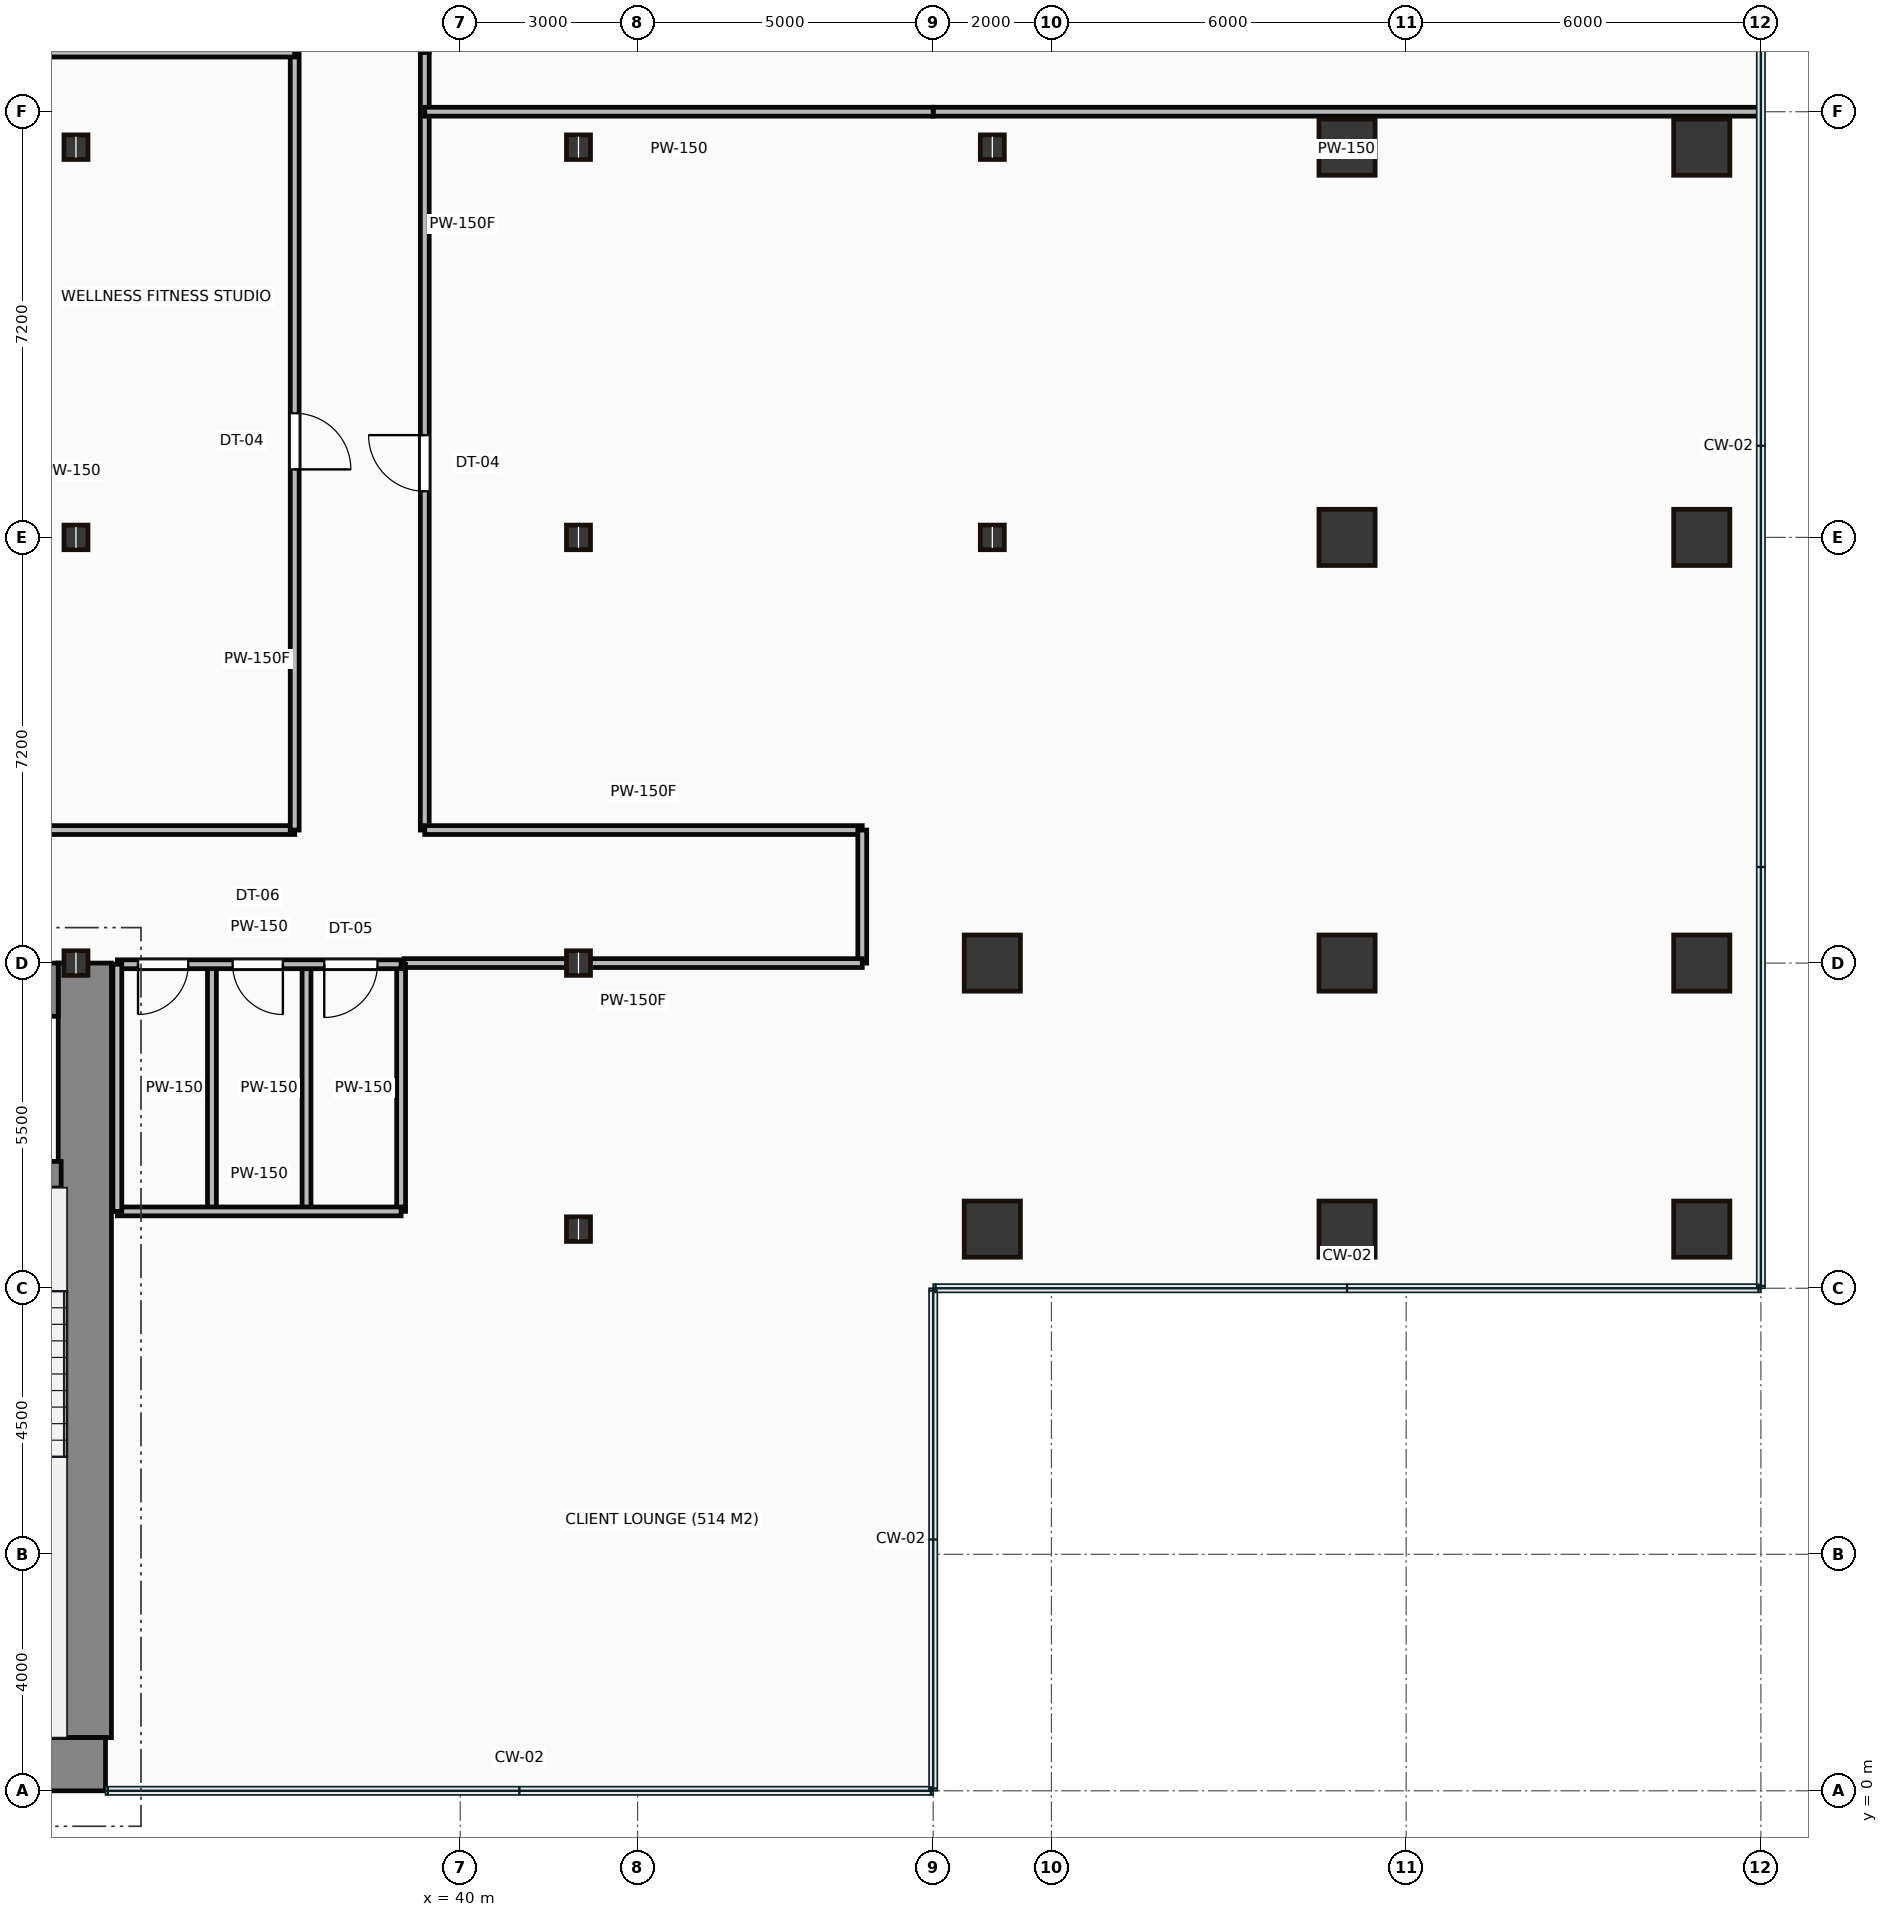
"""IFC4 building model, lengths in metres.
Left out: names, types, materials, properties, quantities, classifications, styles, units other than length and angle.
Written with IfcOpenShell. Run it as: python <this file> out.ifc"""

import sys

from ifc_helpers import new_model, si_unit, direction, frame, frame_2d, origin, origin_2d, place, context, subcontext, project, spatial, rectangle, hollow_rectangle, i_section, extrude, source, transform, mapped, element, fill, save


model = new_model("IFC4")
c1 = context("Model", 3, precision=1e-05, world=origin(), true_north=direction((0.0, 1.0)))
c2 = subcontext(c1, "Body", "Model", "MODEL_VIEW")
j1 = project(units=[si_unit("LENGTHUNIT", "METRE"), si_unit("PLANEANGLEUNIT", "RADIAN")], contexts=[c1])
p1 = place(None, origin())
s1 = spatial("IfcSite", under=j1, at=p1, CompositionType="ELEMENT")
p2 = place(p1, origin())
s2 = spatial("IfcBuilding", under=s1, at=p2, CompositionType="ELEMENT")
p3 = place(p2, frame((0.0, 0.0, 36.15)))
s3 = spatial("IfcBuildingStorey", under=s2, at=p3, CompositionType="ELEMENT", Elevation=36.15)
m1 = source(origin(), c2, "Body", "SweptSolid", [
    extrude(rectangle(XDim=29.5, YDim=0.9, at=frame_2d((14.75, 0.0))), origin(), (0.0, 0.0, 1.0), 3.65),
])
p4 = place(p3, frame((4.5, 0.45, 0.0), z_axis=(0.0, 0.0, 1.0), x_axis=(1.0, 0.0, 0.0)))
e1 = element("IfcWall", 1, at=p4, inside=s3, PredefinedType="SHEAR", context=c2, shape_type="MappedRepresentation", body=[
    mapped(m1, transform((0.0, 0.0, 0.0))),
])
m2 = source(origin(), c2, "Body", "SweptSolid", [
    extrude(rectangle(XDim=13.1, YDim=0.9, at=frame_2d((6.55, 0.0))), origin(), (0.0, 0.0, 1.0), 3.65),
])
p5 = place(p3, frame((33.65, 0.9, 0.0), z_axis=(0.0, 0.0, 1.0), x_axis=(0.0, 1.0, 0.0)))
e2 = element("IfcWall", 2, at=p5, inside=s3, PredefinedType="SHEAR", context=c2, shape_type="MappedRepresentation", body=[
    mapped(m2, transform((0.0, 0.0, 0.0))),
])
m3 = source(origin(), c2, "Body", "SweptSolid", [
    extrude(rectangle(XDim=12.6, YDim=0.9, at=frame_2d((6.3, 0.0))), origin(), (0.0, 0.0, 1.0), 3.65),
])
p6 = place(p3, frame((20.6, 13.55, 0.0), z_axis=(0.0, 0.0, 1.0), x_axis=(1.0, 0.0, 0.0)))
e3 = element("IfcWall", 3, at=p6, inside=s3, PredefinedType="SHEAR", context=c2, shape_type="MappedRepresentation", body=[
    mapped(m3, transform((0.0, 0.0, 0.0))),
])
p7 = place(p6, frame((9.25, 0.0, 0.0)))
e4 = element("IfcOpeningElement", 4, at=p7, cuts=e3, PredefinedType="OPENING", context=c2, shape_type="SweptSolid", body=[
    extrude(rectangle(XDim=1.1, YDim=2.15, at=frame_2d((0.55, 1.075))), frame((0.0, 0.46, 0.0), z_axis=(0.0, -1.0, 0.0), x_axis=(1.0, 0.0, 0.0)), (0.0, 0.0, 1.0), 0.92),
])
m4 = source(origin(), c2, "Body", "SweptSolid", [
    extrude(rectangle(XDim=3.39, YDim=0.45, at=frame_2d((1.695, 0.0))), origin(), (0.0, 0.0, 1.0), 3.65),
])
p8 = place(p3, frame((29.86, 10.42, 0.0), z_axis=(0.0, 0.0, 1.0), x_axis=(1.0, 0.0, 0.0)))
e5 = element("IfcWall", 5, at=p8, inside=s3, PredefinedType="SHEAR", context=c2, shape_type="MappedRepresentation", body=[
    mapped(m4, transform((0.0, 0.0, 0.0))),
])
p9 = place(p8, frame((1.1, 0.0, 0.0)))
e6 = element("IfcOpeningElement", 6, at=p9, cuts=e5, PredefinedType="OPENING", context=c2, shape_type="SweptSolid", body=[
    extrude(rectangle(XDim=1.1, YDim=2.15, at=frame_2d((0.55, 1.075))), frame((0.0, 0.235, 0.0), z_axis=(0.0, -1.0, 0.0), x_axis=(1.0, 0.0, 0.0)), (0.0, 0.0, 1.0), 0.47),
])
m5 = source(origin(), c2, "Body", "SweptSolid", [
    extrude(i_section(OverallWidth=0.406, OverallDepth=0.416, WebThickness=0.03, FlangeThickness=0.048, at=origin_2d()), origin(), (0.0, 0.0, 1.0), 3.65),
])
for number, where, z_axis, x_axis in (
    (7, (33.5, 14.0, 0.0), (0.0, 0.0, 1.0), (1.0, 0.0, 0.0)),
    (8, (33.5, 21.2, 0.0), (0.0, 0.0, 1.0), (1.0, 0.0, 0.0)),
    (9, (33.5, 27.8, 0.0), (0.0, 0.0, 1.0), (1.0, 0.0, 0.0)),
    (10, (42.0, 9.5, 0.0), (0.0, 0.0, 1.0), (1.0, 0.0, 0.0)),
    (11, (42.0, 14.0, 0.0), (0.0, 0.0, 1.0), (1.0, 0.0, 0.0)),
    (12, (42.0, 21.2, 0.0), (0.0, 0.0, 1.0), (1.0, 0.0, 0.0)),
    (13, (42.0, 27.8, 0.0), (0.0, 0.0, 1.0), (1.0, 0.0, 0.0)),
):
    element("IfcColumn", number, at=place(p3, frame(where, z_axis=z_axis, x_axis=x_axis)), inside=s3, PredefinedType="COLUMN", context=c2, shape_type="MappedRepresentation", body=[
        mapped(m5, transform((0.0, 0.0, 0.0))),
    ])
m6 = source(origin(), c2, "Body", "SweptSolid", [
    extrude(hollow_rectangle(XDim=0.95, YDim=0.95, WallThickness=0.045, at=origin_2d()), origin(), (0.0, 0.0, 1.0), 3.65),
])
for number, where, z_axis, x_axis in (
    (14, (49.0, 9.5, 0.0), (0.0, 0.0, 1.0), (1.0, 0.0, 0.0)),
    (15, (49.0, 14.0, 0.0), (0.0, 0.0, 1.0), (1.0, 0.0, 0.0)),
):
    element("IfcColumn", number, at=place(p3, frame(where, z_axis=z_axis, x_axis=x_axis)), inside=s3, PredefinedType="COLUMN", context=c2, shape_type="MappedRepresentation", body=[
        mapped(m6, transform((0.0, 0.0, 0.0))),
    ])
for number, where, z_axis, x_axis in (
    (16, (49.0, 21.2, 0.0), (0.0, 0.0, 1.0), (1.0, 0.0, 0.0)),
    (17, (49.0, 27.8, 0.0), (0.0, 0.0, 1.0), (1.0, 0.0, 0.0)),
):
    element("IfcColumn", number, at=place(p3, frame(where, z_axis=z_axis, x_axis=x_axis)), inside=s3, PredefinedType="COLUMN", context=c2, shape_type="MappedRepresentation", body=[
        mapped(m5, transform((0.0, 0.0, 0.0))),
    ])
for number, where, z_axis, x_axis in (
    (18, (55.0, 9.5, 0.0), (0.0, 0.0, 1.0), (1.0, 0.0, 0.0)),
    (19, (55.0, 14.0, 0.0), (0.0, 0.0, 1.0), (1.0, 0.0, 0.0)),
    (20, (55.0, 21.2, 0.0), (0.0, 0.0, 1.0), (1.0, 0.0, 0.0)),
    (21, (55.0, 27.8, 0.0), (0.0, 0.0, 1.0), (1.0, 0.0, 0.0)),
    (22, (61.0, 9.5, 0.0), (0.0, 0.0, 1.0), (1.0, 0.0, 0.0)),
    (23, (61.0, 14.0, 0.0), (0.0, 0.0, 1.0), (1.0, 0.0, 0.0)),
    (24, (61.0, 21.2, 0.0), (0.0, 0.0, 1.0), (1.0, 0.0, 0.0)),
    (25, (61.0, 27.8, 0.0), (0.0, 0.0, 1.0), (1.0, 0.0, 0.0)),
):
    element("IfcColumn", number, at=place(p3, frame(where, z_axis=z_axis, x_axis=x_axis)), inside=s3, PredefinedType="COLUMN", context=c2, shape_type="MappedRepresentation", body=[
        mapped(m6, transform((0.0, 0.0, 0.0))),
    ])
m7 = source(origin(), c2, "Body", "SweptSolid", [
    extrude(rectangle(XDim=4.8, YDim=0.15, at=frame_2d((2.4, 0.0))), origin(), (0.0, 0.0, 1.0), 2.625),
])
p10 = place(p3, frame((34.2, 13.98, 0.0), z_axis=(0.0, 0.0, 1.0), x_axis=(1.0, 0.0, 0.0)))
e26 = element("IfcWall", 26, at=p10, inside=s3, PredefinedType="PARTITIONING", context=c2, shape_type="MappedRepresentation", body=[
    mapped(m7, transform((0.0, 0.0, 0.0))),
])
p11 = place(p10, frame((0.35, 0.0, 0.0)))
e27 = element("IfcOpeningElement", 27, at=p11, cuts=e26, PredefinedType="OPENING", context=c2, shape_type="SweptSolid", body=[
    extrude(rectangle(XDim=0.85, YDim=2.1, at=frame_2d((0.425, 1.05))), frame((0.0, 0.085, 0.0), z_axis=(0.0, -1.0, 0.0), x_axis=(1.0, 0.0, 0.0)), (0.0, 0.0, 1.0), 0.17),
])
p12 = place(p10, frame((1.95, 0.0, 0.0)))
e28 = element("IfcOpeningElement", 28, at=p12, cuts=e26, PredefinedType="OPENING", context=c2, shape_type="SweptSolid", body=[
    extrude(rectangle(XDim=0.85, YDim=2.1, at=frame_2d((0.425, 1.05))), frame((0.0, 0.085, 0.0), z_axis=(0.0, -1.0, 0.0), x_axis=(1.0, 0.0, 0.0)), (0.0, 0.0, 1.0), 0.17),
])
p13 = place(p10, frame((3.5, 0.0, 0.0)))
e29 = element("IfcOpeningElement", 29, at=p13, cuts=e26, PredefinedType="OPENING", context=c2, shape_type="SweptSolid", body=[
    extrude(rectangle(XDim=0.9, YDim=2.1, at=frame_2d((0.45, 1.05))), frame((0.0, 0.085, 0.0), z_axis=(0.0, -1.0, 0.0), x_axis=(1.0, 0.0, 0.0)), (0.0, 0.0, 1.0), 0.17),
])
m8 = source(origin(), c2, "Body", "SweptSolid", [
    extrude(rectangle(XDim=4.8, YDim=0.15, at=frame_2d((2.4, 0.0))), origin(), (0.0, 0.0, 1.0), 3.4),
])
p14 = place(p3, frame((34.2, 9.8, 0.0), z_axis=(0.0, 0.0, 1.0), x_axis=(1.0, 0.0, 0.0)))
e30 = element("IfcWall", 30, at=p14, inside=s3, PredefinedType="PARTITIONING", context=c2, shape_type="MappedRepresentation", body=[
    mapped(m8, transform((0.0, 0.0, 0.0))),
])
m9 = source(origin(), c2, "Body", "SweptSolid", [
    extrude(rectangle(XDim=4.18, YDim=0.15, at=frame_2d((2.09, 0.0))), origin(), (0.0, 0.0, 1.0), 3.4),
])
for number, where, z_axis, x_axis in (
    (31, (39.0, 9.8, 0.0), (0.0, 0.0, 1.0), (0.0, 1.0, 0.0)),
    (32, (34.2, 9.8, 0.0), (0.0, 0.0, 1.0), (0.0, 1.0, 0.0)),
    (33, (35.8, 9.8, 0.0), (0.0, 0.0, 1.0), (0.0, 1.0, 0.0)),
    (34, (37.4, 9.8, 0.0), (0.0, 0.0, 1.0), (0.0, 1.0, 0.0)),
):
    element("IfcWall", number, at=place(p3, frame(where, z_axis=z_axis, x_axis=x_axis)), inside=s3, PredefinedType="PARTITIONING", context=c2, shape_type="MappedRepresentation", body=[
        mapped(m9, transform((0.0, 0.0, 0.0))),
    ])
m10 = source(origin(), c2, "Body", "SweptSolid", [
    extrude(rectangle(XDim=13.15, YDim=0.15, at=frame_2d((6.575, 0.0))), origin(), (0.0, 0.0, 1.0), 3.4),
])
p15 = place(p3, frame((39.4, 29.4, 0.0), z_axis=(0.0, 0.0, 1.0), x_axis=(0.0, -1.0, 0.0)))
e35 = element("IfcWall", 35, at=p15, inside=s3, PredefinedType="PARTITIONING", context=c2, shape_type="MappedRepresentation", body=[
    mapped(m10, transform((0.0, 0.0, 0.0))),
])
p16 = place(p15, frame((6.47, 0.0, 0.0)))
e36 = element("IfcOpeningElement", 36, at=p16, cuts=e35, PredefinedType="OPENING", context=c2, shape_type="SweptSolid", body=[
    extrude(rectangle(XDim=0.95, YDim=2.15, at=frame_2d((0.475, 1.075))), frame((0.0, 0.085, 0.0), z_axis=(0.0, -1.0, 0.0), x_axis=(1.0, 0.0, 0.0)), (0.0, 0.0, 1.0), 0.17),
])
m11 = source(origin(), c2, "Body", "SweptSolid", [
    extrude(rectangle(XDim=7.4, YDim=0.15, at=frame_2d((3.7, 0.0))), origin(), (0.0, 0.0, 1.0), 3.4),
])
p17 = place(p3, frame((39.4, 16.25, 0.0), z_axis=(0.0, 0.0, 1.0), x_axis=(1.0, 0.0, 0.0)))
e37 = element("IfcWall", 37, at=p17, inside=s3, PredefinedType="PARTITIONING", context=c2, shape_type="MappedRepresentation", body=[
    mapped(m11, transform((0.0, 0.0, 0.0))),
])
m12 = source(origin(), c2, "Body", "SweptSolid", [
    extrude(rectangle(XDim=2.25, YDim=0.15, at=frame_2d((1.125, 0.0))), origin(), (0.0, 0.0, 1.0), 3.4),
])
p18 = place(p3, frame((46.8, 16.25, 0.0), z_axis=(0.0, 0.0, 1.0), x_axis=(0.0, -1.0, 0.0)))
e38 = element("IfcWall", 38, at=p18, inside=s3, PredefinedType="PARTITIONING", context=c2, shape_type="MappedRepresentation", body=[
    mapped(m12, transform((0.0, 0.0, 0.0))),
])
m13 = source(origin(), c2, "Body", "SweptSolid", [
    extrude(rectangle(XDim=7.75, YDim=0.15, at=frame_2d((3.875, 0.0))), origin(), (0.0, 0.0, 1.0), 2.625),
])
p19 = place(p3, frame((46.8, 14.0, 0.0), z_axis=(0.0, 0.0, 1.0), x_axis=(-1.0, 0.0, 0.0)))
e39 = element("IfcWall", 39, at=p19, inside=s3, PredefinedType="PARTITIONING", context=c2, shape_type="MappedRepresentation", body=[
    mapped(m13, transform((0.0, 0.0, 0.0))),
])
m14 = source(origin(), c2, "Body", "SweptSolid", [
    extrude(rectangle(XDim=25.2, YDim=0.15, at=frame_2d((12.6, 0.0))), origin(), (0.0, 0.0, 1.0), 3.4),
])
p20 = place(p3, frame((12.0, 16.25, 0.0), z_axis=(0.0, 0.0, 1.0), x_axis=(1.0, 0.0, 0.0)))
e40 = element("IfcWall", 40, at=p20, inside=s3, PredefinedType="PARTITIONING", context=c2, shape_type="MappedRepresentation", body=[
    mapped(m14, transform((0.0, 0.0, 0.0))),
])
p21 = place(p20, frame((14.925, 0.0, 0.0)))
e41 = element("IfcOpeningElement", 41, at=p21, cuts=e40, PredefinedType="OPENING", context=c2, shape_type="SweptSolid", body=[
    extrude(rectangle(XDim=0.95, YDim=2.15, at=frame_2d((0.475, 1.075))), frame((0.0, 0.085, 0.0), z_axis=(0.0, -1.0, 0.0), x_axis=(1.0, 0.0, 0.0)), (0.0, 0.0, 1.0), 0.17),
])
p22 = place(p3, frame((37.2, 16.25, 0.0), z_axis=(0.0, 0.0, 1.0), x_axis=(0.0, 1.0, 0.0)))
e42 = element("IfcWall", 42, at=p22, inside=s3, PredefinedType="PARTITIONING", context=c2, shape_type="MappedRepresentation", body=[
    mapped(m10, transform((0.0, 0.0, 0.0))),
])
p23 = place(p22, frame((6.1, 0.0, 0.0)))
e43 = element("IfcOpeningElement", 43, at=p23, cuts=e42, PredefinedType="OPENING", context=c2, shape_type="SweptSolid", body=[
    extrude(rectangle(XDim=0.95, YDim=2.15, at=frame_2d((0.475, 1.075))), frame((0.0, 0.085, 0.0), z_axis=(0.0, -1.0, 0.0), x_axis=(1.0, 0.0, 0.0)), (0.0, 0.0, 1.0), 0.17),
])
p24 = place(p3, frame((37.2, 29.4, 0.0), z_axis=(0.0, 0.0, 1.0), x_axis=(-1.0, 0.0, 0.0)))
e44 = element("IfcWall", 44, at=p24, inside=s3, PredefinedType="PARTITIONING", context=c2, shape_type="MappedRepresentation", body=[
    mapped(m14, transform((0.0, 0.0, 0.0))),
])
m15 = source(origin(), c2, "Body", "SweptSolid", [
    extrude(rectangle(XDim=13.98, YDim=0.15, at=frame_2d((6.99, 0.0))), origin(), (0.0, 0.0, 1.0), 3.4),
])
p25 = place(p3, frame((61.98, 28.4, 0.0), z_axis=(0.0, 0.0, 1.0), x_axis=(-1.0, 0.0, 0.0)))
e45 = element("IfcWall", 45, at=p25, inside=s3, PredefinedType="PARTITIONING", context=c2, shape_type="MappedRepresentation", body=[
    mapped(m15, transform((0.0, 0.0, 0.0))),
])
m16 = source(origin(), c2, "Body", "SweptSolid", [
    extrude(rectangle(XDim=8.6, YDim=0.15, at=frame_2d((4.3, 0.0))), origin(), (0.0, 0.0, 1.0), 3.4),
])
p26 = place(p3, frame((48.0, 28.4, 0.0), z_axis=(0.0, 0.0, 1.0), x_axis=(-1.0, 0.0, 0.0)))
e46 = element("IfcWall", 46, at=p26, inside=s3, PredefinedType="PARTITIONING", context=c2, shape_type="MappedRepresentation", body=[
    mapped(m16, transform((0.0, 0.0, 0.0))),
])
m17 = source(origin(), c2, "Body", "SweptSolid", [
    extrude(rectangle(XDim=0.85, YDim=2.1, at=frame_2d((0.425, 1.05))), frame((0.0, 0.025, 0.0), z_axis=(0.0, -1.0, 0.0), x_axis=(1.0, 0.0, 0.0)), (0.0, 0.0, 1.0), 0.05),
])
p27 = place(p11, frame((0.85, 0.0, 0.0), z_axis=(0.0, 0.0, 1.0), x_axis=(-1.0, 0.0, 0.0)))
e47 = element("IfcDoor", 47, at=p27, inside=s3, OperationType="SINGLE_SWING_LEFT", PredefinedType="DOOR", context=c2, shape_type="MappedRepresentation", body=[
    mapped(m17, transform((0.0, 0.0, 0.0))),
])
fill(e27, e47)
p28 = place(p12, frame((0.85, 0.0, 0.0), z_axis=(0.0, 0.0, 1.0), x_axis=(-1.0, 0.0, 0.0)))
e48 = element("IfcDoor", 48, at=p28, inside=s3, OperationType="SINGLE_SWING_RIGHT", PredefinedType="DOOR", context=c2, shape_type="MappedRepresentation", body=[
    mapped(m17, transform((0.0, 0.0, 0.0))),
])
fill(e28, e48)
m18 = source(origin(), c2, "Body", "SweptSolid", [
    extrude(rectangle(XDim=0.9, YDim=2.1, at=frame_2d((0.45, 1.05))), frame((0.0, 0.025, 0.0), z_axis=(0.0, -1.0, 0.0), x_axis=(1.0, 0.0, 0.0)), (0.0, 0.0, 1.0), 0.05),
])
p29 = place(p13, frame((0.9, 0.0, 0.0), z_axis=(0.0, 0.0, 1.0), x_axis=(-1.0, 0.0, 0.0)))
e49 = element("IfcDoor", 49, at=p29, inside=s3, OperationType="SINGLE_SWING_LEFT", PredefinedType="DOOR", context=c2, shape_type="MappedRepresentation", body=[
    mapped(m18, transform((0.0, 0.0, 0.0))),
])
fill(e29, e49)
m19 = source(origin(), c2, "Body", "SweptSolid", [
    extrude(rectangle(XDim=0.95, YDim=2.15, at=frame_2d((0.475, 1.075))), frame((0.0, 0.025, 0.0), z_axis=(0.0, -1.0, 0.0), x_axis=(1.0, 0.0, 0.0)), (0.0, 0.0, 1.0), 0.05),
])
p30 = place(p23, origin())
e50 = element("IfcDoor", 50, at=p30, inside=s3, OperationType="SINGLE_SWING_LEFT", PredefinedType="DOOR", context=c2, shape_type="MappedRepresentation", body=[
    mapped(m19, transform((0.0, 0.0, 0.0))),
])
fill(e43, e50)
p31 = place(p16, origin())
e51 = element("IfcDoor", 51, at=p31, inside=s3, OperationType="SINGLE_SWING_LEFT", PredefinedType="DOOR", context=c2, shape_type="MappedRepresentation", body=[
    mapped(m19, transform((0.0, 0.0, 0.0))),
])
fill(e36, e51)
save(model, sys.argv[1])
